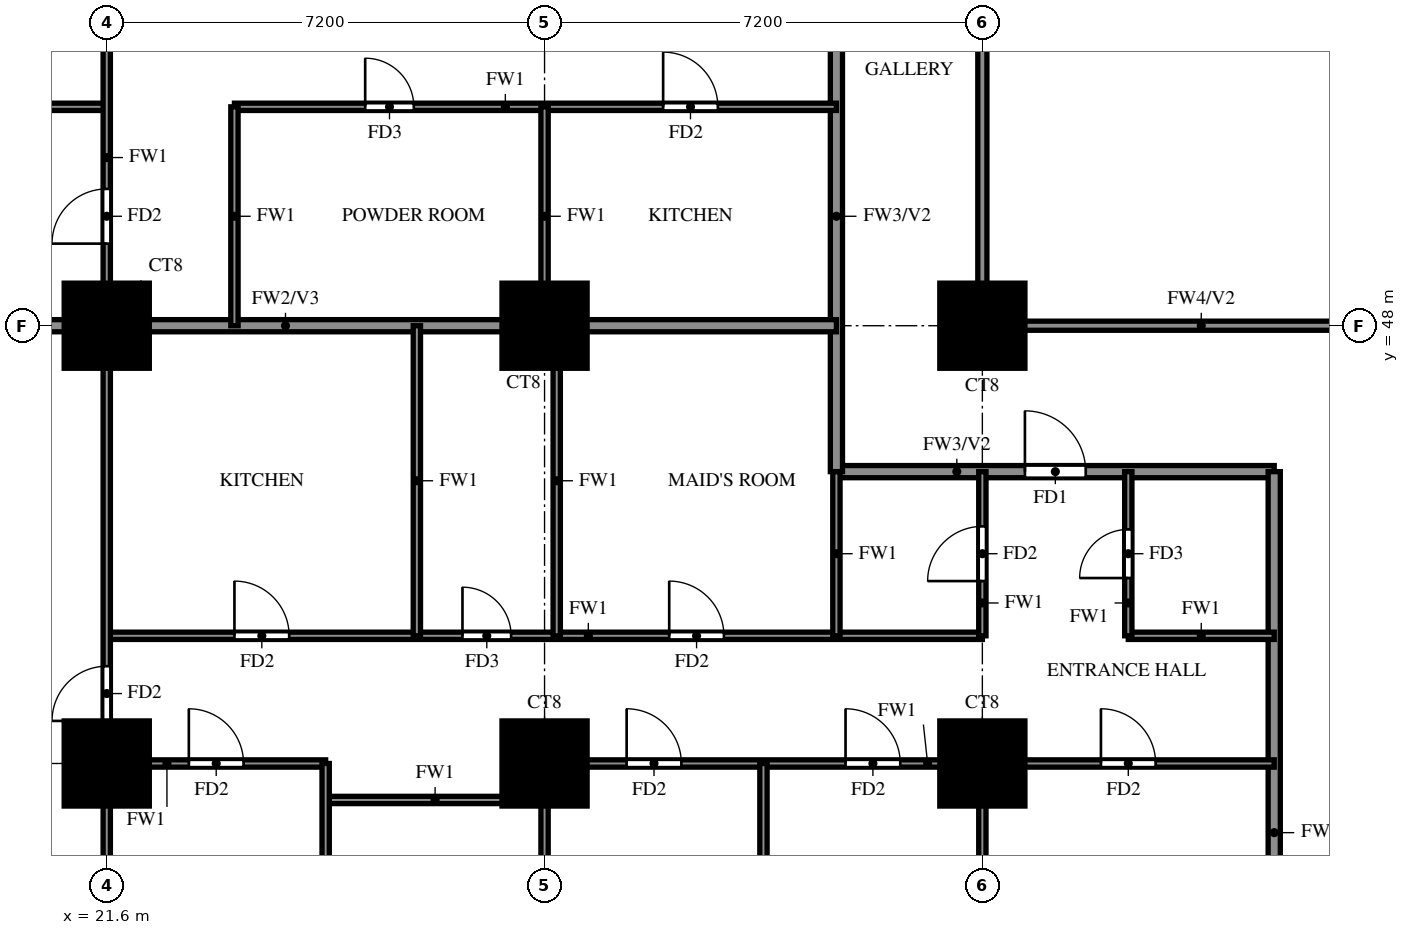
"""IFC4 building model, lengths in metres.
Left out: names, types, materials, properties, quantities, classifications, styles, units other than length and angle.
Written with IfcOpenShell. Run it as: python <this file> out.ifc"""

import sys

from ifc_helpers import new_model, si_unit, direction, frame, frame_2d, origin, origin_2d, place, context, subcontext, project, spatial, rectangle, extrude, source, transform, mapped, element, fill, save


model = new_model("IFC4")
c1 = context("Model", 3, precision=1e-05, world=origin(), true_north=direction((0.0, 1.0)))
c2 = subcontext(c1, "Body", "Model", "MODEL_VIEW")
j1 = project(units=[si_unit("LENGTHUNIT", "METRE"), si_unit("PLANEANGLEUNIT", "RADIAN")], contexts=[c1])
p1 = place(None, origin())
s1 = spatial("IfcSite", under=j1, at=p1, CompositionType="ELEMENT")
p2 = place(p1, origin())
s2 = spatial("IfcBuilding", under=s1, at=p2, CompositionType="ELEMENT")
p3 = place(p2, frame((0.0, 0.0, 48.0)))
s3 = spatial("IfcBuildingStorey", under=s2, at=p3, CompositionType="ELEMENT", Elevation=48.0)
m1 = source(origin(), c2, "Body", "SweptSolid", [
    extrude(rectangle(XDim=1.4, YDim=1.4, at=origin_2d()), origin(), (0.0, 0.0, 1.0), 3.18),
])
for number, where, z_axis, x_axis in (
    (1, (21.6, 40.8, 0.0), (0.0, 0.0, 1.0), (1.0, 0.0, 0.0)),
    (2, (28.8, 40.8, 0.0), (0.0, 0.0, 1.0), (1.0, 0.0, 0.0)),
    (3, (36.0, 40.8, 0.0), (0.0, 0.0, 1.0), (1.0, 0.0, 0.0)),
    (4, (21.6, 48.0, 0.0), (0.0, 0.0, 1.0), (1.0, 0.0, 0.0)),
    (5, (28.8, 48.0, 0.0), (0.0, 0.0, 1.0), (1.0, 0.0, 0.0)),
    (6, (36.0, 48.0, 0.0), (0.0, 0.0, 1.0), (1.0, 0.0, 0.0)),
):
    element("IfcColumn", number, at=place(p3, frame(where, z_axis=z_axis, x_axis=x_axis)), inside=s3, PredefinedType="COLUMN", context=c2, shape_type="MappedRepresentation", body=[
        mapped(m1, transform((0.0, 0.0, 0.0))),
    ])
p4 = place(p3, frame((33.6, 45.6, 0.0), z_axis=(0.0, 0.0, 1.0), x_axis=(1.0, 0.0, 0.0)))
e7 = element("IfcWall", 7, at=p4, inside=s3, PredefinedType="SOLIDWALL", context=c2, shape_type="SweptSolid", body=[
    extrude(rectangle(XDim=7.2, YDim=0.2, at=frame_2d((3.6, 0.0))), origin(), (0.0, 0.0, 1.0), 3.18),
])
p5 = place(p4, frame((3.1, 0.0, 0.0)))
e8 = element("IfcOpeningElement", 8, at=p5, cuts=e7, PredefinedType="OPENING", context=c2, shape_type="SweptSolid", body=[
    extrude(rectangle(XDim=1.0, YDim=2.1, at=frame_2d((0.5, 1.05))), frame((0.0, 0.11, 0.0), z_axis=(0.0, -1.0, 0.0), x_axis=(1.0, 0.0, 0.0)), (0.0, 0.0, 1.0), 0.22),
])
p6 = place(p3, frame((33.6, 45.6, 0.0), z_axis=(0.0, 0.0, 1.0), x_axis=(0.0, 1.0, 0.0)))
e9 = element("IfcWall", 9, at=p6, inside=s3, PredefinedType="SOLIDWALL", context=c2, shape_type="SweptSolid", body=[
    extrude(rectangle(XDim=8.4, YDim=0.2, at=frame_2d((4.2, 0.0))), origin(), (0.0, 0.0, 1.0), 3.18),
])
p7 = place(p3, frame((40.8, 33.725, 0.0), z_axis=(0.0, 0.0, 1.0), x_axis=(0.0, 1.0, 0.0)))
e10 = element("IfcWall", 10, at=p7, inside=s3, PredefinedType="SOLIDWALL", context=c2, shape_type="SweptSolid", body=[
    extrude(rectangle(XDim=11.875, YDim=0.2, at=frame_2d((5.938, 0.0))), origin(), (0.0, 0.0, 1.0), 2.28),
])
p8 = place(p3, frame((14.525, 48.0, 0.0), z_axis=(0.0, 0.0, 1.0), x_axis=(1.0, 0.0, 0.0)))
e11 = element("IfcWall", 11, at=p8, inside=s3, PredefinedType="SOLIDWALL", context=c2, shape_type="SweptSolid", body=[
    extrude(rectangle(XDim=19.075, YDim=0.2, at=frame_2d((9.538, 0.0))), origin(), (0.0, 0.0, 1.0), 3.18),
])
p9 = place(p3, frame((25.2, 40.2, 0.0), z_axis=(0.0, 0.0, 1.0), x_axis=(1.0, 0.0, 0.0)))
e12 = element("IfcWall", 12, at=p9, inside=s3, PredefinedType="PARTITIONING", context=c2, shape_type="SweptSolid", body=[
    extrude(rectangle(XDim=3.6, YDim=0.12, at=frame_2d((1.8, 0.0))), origin(), (0.0, 0.0, 1.0), 3.18),
])
p10 = place(p3, frame((21.6, 40.8, 0.0), z_axis=(0.0, 0.0, 1.0), x_axis=(1.0, 0.0, 0.0)))
e13 = element("IfcWall", 13, at=p10, inside=s3, PredefinedType="PARTITIONING", context=c2, shape_type="SweptSolid", body=[
    extrude(rectangle(XDim=3.6, YDim=0.12, at=frame_2d((1.8, 0.0))), origin(), (0.0, 0.0, 1.0), 3.18),
])
p11 = place(p10, frame((1.35, 0.0, 0.0)))
e14 = element("IfcOpeningElement", 14, at=p11, cuts=e13, PredefinedType="OPENING", context=c2, shape_type="SweptSolid", body=[
    extrude(rectangle(XDim=0.9, YDim=2.1, at=frame_2d((0.45, 1.05))), frame((0.0, 0.07, 0.0), z_axis=(0.0, -1.0, 0.0), x_axis=(1.0, 0.0, 0.0)), (0.0, 0.0, 1.0), 0.14),
])
p12 = place(p3, frame((28.8, 40.8, 0.0), z_axis=(0.0, 0.0, 1.0), x_axis=(1.0, 0.0, 0.0)))
e15 = element("IfcWall", 15, at=p12, inside=s3, PredefinedType="PARTITIONING", context=c2, shape_type="SweptSolid", body=[
    extrude(rectangle(XDim=12.0, YDim=0.12, at=frame_2d((6.0, 0.0))), origin(), (0.0, 0.0, 1.0), 3.18),
])
p13 = place(p12, frame((1.35, 0.0, 0.0)))
e16 = element("IfcOpeningElement", 16, at=p13, cuts=e15, PredefinedType="OPENING", context=c2, shape_type="SweptSolid", body=[
    extrude(rectangle(XDim=0.9, YDim=2.1, at=frame_2d((0.45, 1.05))), frame((0.0, 0.07, 0.0), z_axis=(0.0, -1.0, 0.0), x_axis=(1.0, 0.0, 0.0)), (0.0, 0.0, 1.0), 0.14),
])
p14 = place(p12, frame((4.95, 0.0, 0.0)))
e17 = element("IfcOpeningElement", 17, at=p14, cuts=e15, PredefinedType="OPENING", context=c2, shape_type="SweptSolid", body=[
    extrude(rectangle(XDim=0.9, YDim=2.1, at=frame_2d((0.45, 1.05))), frame((0.0, 0.07, 0.0), z_axis=(0.0, -1.0, 0.0), x_axis=(1.0, 0.0, 0.0)), (0.0, 0.0, 1.0), 0.14),
])
p15 = place(p12, frame((9.15, 0.0, 0.0)))
e18 = element("IfcOpeningElement", 18, at=p15, cuts=e15, PredefinedType="OPENING", context=c2, shape_type="SweptSolid", body=[
    extrude(rectangle(XDim=0.9, YDim=2.1, at=frame_2d((0.45, 1.05))), frame((0.0, 0.07, 0.0), z_axis=(0.0, -1.0, 0.0), x_axis=(1.0, 0.0, 0.0)), (0.0, 0.0, 1.0), 0.14),
])
p16 = place(p3, frame((21.6, 42.9, 0.0), z_axis=(0.0, 0.0, 1.0), x_axis=(1.0, 0.0, 0.0)))
e19 = element("IfcWall", 19, at=p16, inside=s3, PredefinedType="PARTITIONING", context=c2, shape_type="SweptSolid", body=[
    extrude(rectangle(XDim=14.4, YDim=0.12, at=frame_2d((7.2, 0.0))), origin(), (0.0, 0.0, 1.0), 3.18),
])
p17 = place(p16, frame((2.1, 0.0, 0.0)))
e20 = element("IfcOpeningElement", 20, at=p17, cuts=e19, PredefinedType="OPENING", context=c2, shape_type="SweptSolid", body=[
    extrude(rectangle(XDim=0.9, YDim=2.1, at=frame_2d((0.45, 1.05))), frame((0.0, 0.07, 0.0), z_axis=(0.0, -1.0, 0.0), x_axis=(1.0, 0.0, 0.0)), (0.0, 0.0, 1.0), 0.14),
])
p18 = place(p16, frame((5.85, 0.0, 0.0)))
e21 = element("IfcOpeningElement", 21, at=p18, cuts=e19, PredefinedType="OPENING", context=c2, shape_type="SweptSolid", body=[
    extrude(rectangle(XDim=0.8, YDim=2.1, at=frame_2d((0.4, 1.05))), frame((0.0, 0.07, 0.0), z_axis=(0.0, -1.0, 0.0), x_axis=(1.0, 0.0, 0.0)), (0.0, 0.0, 1.0), 0.14),
])
p19 = place(p16, frame((9.25, 0.0, 0.0)))
e22 = element("IfcOpeningElement", 22, at=p19, cuts=e19, PredefinedType="OPENING", context=c2, shape_type="SweptSolid", body=[
    extrude(rectangle(XDim=0.9, YDim=2.1, at=frame_2d((0.45, 1.05))), frame((0.0, 0.07, 0.0), z_axis=(0.0, -1.0, 0.0), x_axis=(1.0, 0.0, 0.0)), (0.0, 0.0, 1.0), 0.14),
])
p20 = place(p3, frame((38.4, 42.9, 0.0), z_axis=(0.0, 0.0, 1.0), x_axis=(1.0, 0.0, 0.0)))
e23 = element("IfcWall", 23, at=p20, inside=s3, PredefinedType="PARTITIONING", context=c2, shape_type="SweptSolid", body=[
    extrude(rectangle(XDim=2.4, YDim=0.12, at=frame_2d((1.2, 0.0))), origin(), (0.0, 0.0, 1.0), 3.18),
])
p21 = place(p3, frame((14.525, 51.6, 0.0), z_axis=(0.0, 0.0, 1.0), x_axis=(1.0, 0.0, 0.0)))
e24 = element("IfcWall", 24, at=p21, inside=s3, PredefinedType="PARTITIONING", context=c2, shape_type="SweptSolid", body=[
    extrude(rectangle(XDim=7.075, YDim=0.12, at=frame_2d((3.538, 0.0))), origin(), (0.0, 0.0, 1.0), 2.28),
])
p22 = place(p3, frame((23.7, 51.6, 0.0), z_axis=(0.0, 0.0, 1.0), x_axis=(1.0, 0.0, 0.0)))
e25 = element("IfcWall", 25, at=p22, inside=s3, PredefinedType="PARTITIONING", context=c2, shape_type="SweptSolid", body=[
    extrude(rectangle(XDim=9.9, YDim=0.12, at=frame_2d((4.95, 0.0))), origin(), (0.0, 0.0, 1.0), 3.18),
])
p23 = place(p22, frame((2.15, 0.0, 0.0)))
e26 = element("IfcOpeningElement", 26, at=p23, cuts=e25, PredefinedType="OPENING", context=c2, shape_type="SweptSolid", body=[
    extrude(rectangle(XDim=0.8, YDim=2.1, at=frame_2d((0.4, 1.05))), frame((0.0, 0.07, 0.0), z_axis=(0.0, -1.0, 0.0), x_axis=(1.0, 0.0, 0.0)), (0.0, 0.0, 1.0), 0.14),
])
p24 = place(p22, frame((7.05, 0.0, 0.0)))
e27 = element("IfcOpeningElement", 27, at=p24, cuts=e25, PredefinedType="OPENING", context=c2, shape_type="SweptSolid", body=[
    extrude(rectangle(XDim=0.9, YDim=2.1, at=frame_2d((0.45, 1.05))), frame((0.0, 0.07, 0.0), z_axis=(0.0, -1.0, 0.0), x_axis=(1.0, 0.0, 0.0)), (0.0, 0.0, 1.0), 0.14),
])
p25 = place(p3, frame((21.6, 33.725, 0.0), z_axis=(0.0, 0.0, 1.0), x_axis=(0.0, 1.0, 0.0)))
e28 = element("IfcWall", 28, at=p25, inside=s3, PredefinedType="PARTITIONING", context=c2, shape_type="SweptSolid", body=[
    extrude(rectangle(XDim=35.875, YDim=0.12, at=frame_2d((17.938, 0.0))), origin(), (0.0, 0.0, 1.0), 3.18),
])
p26 = place(p25, frame((7.775, 0.0, 0.0)))
e29 = element("IfcOpeningElement", 29, at=p26, cuts=e28, PredefinedType="OPENING", context=c2, shape_type="SweptSolid", body=[
    extrude(rectangle(XDim=0.9, YDim=2.1, at=frame_2d((0.45, 1.05))), frame((0.0, 0.07, 0.0), z_axis=(0.0, -1.0, 0.0), x_axis=(1.0, 0.0, 0.0)), (0.0, 0.0, 1.0), 0.14),
])
p27 = place(p25, frame((15.625, 0.0, 0.0)))
e30 = element("IfcOpeningElement", 30, at=p27, cuts=e28, PredefinedType="OPENING", context=c2, shape_type="SweptSolid", body=[
    extrude(rectangle(XDim=0.9, YDim=2.1, at=frame_2d((0.45, 1.05))), frame((0.0, 0.07, 0.0), z_axis=(0.0, -1.0, 0.0), x_axis=(1.0, 0.0, 0.0)), (0.0, 0.0, 1.0), 0.14),
])
p28 = place(p25, frame((22.225, 0.0, 0.0)))
e31 = element("IfcOpeningElement", 31, at=p28, cuts=e28, PredefinedType="OPENING", context=c2, shape_type="SweptSolid", body=[
    extrude(rectangle(XDim=1.5, YDim=2.1, at=frame_2d((0.75, 1.05))), frame((0.0, 0.07, 0.0), z_axis=(0.0, -1.0, 0.0), x_axis=(1.0, 0.0, 0.0)), (0.0, 0.0, 1.0), 0.14),
])
p29 = place(p25, frame((26.425, 0.0, 0.0)))
e32 = element("IfcOpeningElement", 32, at=p29, cuts=e28, PredefinedType="OPENING", context=c2, shape_type="SweptSolid", body=[
    extrude(rectangle(XDim=0.9, YDim=2.1, at=frame_2d((0.45, 1.05))), frame((0.0, 0.07, 0.0), z_axis=(0.0, -1.0, 0.0), x_axis=(1.0, 0.0, 0.0)), (0.0, 0.0, 1.0), 0.14),
])
p30 = place(p25, frame((31.825, 0.0, 0.0)))
e33 = element("IfcOpeningElement", 33, at=p30, cuts=e28, PredefinedType="OPENING", context=c2, shape_type="SweptSolid", body=[
    extrude(rectangle(XDim=0.9, YDim=2.1, at=frame_2d((0.45, 1.05))), frame((0.0, 0.07, 0.0), z_axis=(0.0, -1.0, 0.0), x_axis=(1.0, 0.0, 0.0)), (0.0, 0.0, 1.0), 0.14),
])
p31 = place(p3, frame((23.7, 48.0, 0.0), z_axis=(0.0, 0.0, 1.0), x_axis=(0.0, 1.0, 0.0)))
e34 = element("IfcWall", 34, at=p31, inside=s3, PredefinedType="PARTITIONING", context=c2, shape_type="SweptSolid", body=[
    extrude(rectangle(XDim=3.6, YDim=0.12, at=frame_2d((1.8, 0.0))), origin(), (0.0, 0.0, 1.0), 3.18),
])
p32 = place(p3, frame((25.2, 33.725, 0.0), z_axis=(0.0, 0.0, 1.0), x_axis=(0.0, 1.0, 0.0)))
e35 = element("IfcWall", 35, at=p32, inside=s3, PredefinedType="PARTITIONING", context=c2, shape_type="SweptSolid", body=[
    extrude(rectangle(XDim=7.075, YDim=0.12, at=frame_2d((3.538, 0.0))), origin(), (0.0, 0.0, 1.0), 2.28),
])
p33 = place(p32, frame((2.837, 0.0, 0.0)))
e36 = element("IfcOpeningElement", 36, at=p33, cuts=e35, PredefinedType="OPENING", context=c2, shape_type="SweptSolid", body=[
    extrude(rectangle(XDim=0.8, YDim=2.1, at=frame_2d((0.4, 1.05))), frame((0.0, 0.07, 0.0), z_axis=(0.0, -1.0, 0.0), x_axis=(1.0, 0.0, 0.0)), (0.0, 0.0, 1.0), 0.14),
])
p34 = place(p3, frame((26.7, 42.9, 0.0), z_axis=(0.0, 0.0, 1.0), x_axis=(0.0, 1.0, 0.0)))
e37 = element("IfcWall", 37, at=p34, inside=s3, PredefinedType="PARTITIONING", context=c2, shape_type="SweptSolid", body=[
    extrude(rectangle(XDim=5.1, YDim=0.12, at=frame_2d((2.55, 0.0))), origin(), (0.0, 0.0, 1.0), 3.18),
])
p35 = place(p3, frame((28.8, 33.725, 0.0), z_axis=(0.0, 0.0, 1.0), x_axis=(0.0, 1.0, 0.0)))
e38 = element("IfcWall", 38, at=p35, inside=s3, PredefinedType="PARTITIONING", context=c2, shape_type="SweptSolid", body=[
    extrude(rectangle(XDim=7.075, YDim=0.12, at=frame_2d((3.538, 0.0))), origin(), (0.0, 0.0, 1.0), 3.18),
])
p36 = place(p3, frame((28.8, 48.0, 0.0), z_axis=(0.0, 0.0, 1.0), x_axis=(0.0, 1.0, 0.0)))
e39 = element("IfcWall", 39, at=p36, inside=s3, PredefinedType="PARTITIONING", context=c2, shape_type="SweptSolid", body=[
    extrude(rectangle(XDim=3.6, YDim=0.12, at=frame_2d((1.8, 0.0))), origin(), (0.0, 0.0, 1.0), 3.18),
])
p37 = place(p3, frame((29.0, 42.9, 0.0), z_axis=(0.0, 0.0, 1.0), x_axis=(0.0, 1.0, 0.0)))
e40 = element("IfcWall", 40, at=p37, inside=s3, PredefinedType="PARTITIONING", context=c2, shape_type="SweptSolid", body=[
    extrude(rectangle(XDim=5.1, YDim=0.12, at=frame_2d((2.55, 0.0))), origin(), (0.0, 0.0, 1.0), 3.18),
])
p38 = place(p3, frame((32.4, 33.725, 0.0), z_axis=(0.0, 0.0, 1.0), x_axis=(0.0, 1.0, 0.0)))
e41 = element("IfcWall", 41, at=p38, inside=s3, PredefinedType="PARTITIONING", context=c2, shape_type="SweptSolid", body=[
    extrude(rectangle(XDim=7.075, YDim=0.12, at=frame_2d((3.538, 0.0))), origin(), (0.0, 0.0, 1.0), 2.28),
])
p39 = place(p3, frame((33.6, 42.9, 0.0), z_axis=(0.0, 0.0, 1.0), x_axis=(0.0, 1.0, 0.0)))
e42 = element("IfcWall", 42, at=p39, inside=s3, PredefinedType="PARTITIONING", context=c2, shape_type="SweptSolid", body=[
    extrude(rectangle(XDim=2.7, YDim=0.12, at=frame_2d((1.35, 0.0))), origin(), (0.0, 0.0, 1.0), 3.18),
])
p40 = place(p3, frame((36.0, 33.725, 0.0), z_axis=(0.0, 0.0, 1.0), x_axis=(0.0, 1.0, 0.0)))
e43 = element("IfcWall", 43, at=p40, inside=s3, PredefinedType="PARTITIONING", context=c2, shape_type="SweptSolid", body=[
    extrude(rectangle(XDim=7.075, YDim=0.12, at=frame_2d((3.538, 0.0))), origin(), (0.0, 0.0, 1.0), 3.18),
])
p41 = place(p3, frame((36.0, 42.9, 0.0), z_axis=(0.0, 0.0, 1.0), x_axis=(0.0, 1.0, 0.0)))
e44 = element("IfcWall", 44, at=p41, inside=s3, PredefinedType="PARTITIONING", context=c2, shape_type="SweptSolid", body=[
    extrude(rectangle(XDim=2.7, YDim=0.12, at=frame_2d((1.35, 0.0))), origin(), (0.0, 0.0, 1.0), 3.18),
])
p42 = place(p41, frame((0.9, 0.0, 0.0)))
e45 = element("IfcOpeningElement", 45, at=p42, cuts=e44, PredefinedType="OPENING", context=c2, shape_type="SweptSolid", body=[
    extrude(rectangle(XDim=0.9, YDim=2.1, at=frame_2d((0.45, 1.05))), frame((0.0, 0.07, 0.0), z_axis=(0.0, -1.0, 0.0), x_axis=(1.0, 0.0, 0.0)), (0.0, 0.0, 1.0), 0.14),
])
p43 = place(p3, frame((38.4, 42.9, 0.0), z_axis=(0.0, 0.0, 1.0), x_axis=(0.0, 1.0, 0.0)))
e46 = element("IfcWall", 46, at=p43, inside=s3, PredefinedType="PARTITIONING", context=c2, shape_type="SweptSolid", body=[
    extrude(rectangle(XDim=2.7, YDim=0.12, at=frame_2d((1.35, 0.0))), origin(), (0.0, 0.0, 1.0), 3.18),
])
p44 = place(p43, frame((0.95, 0.0, 0.0)))
e47 = element("IfcOpeningElement", 47, at=p44, cuts=e46, PredefinedType="OPENING", context=c2, shape_type="SweptSolid", body=[
    extrude(rectangle(XDim=0.8, YDim=2.1, at=frame_2d((0.4, 1.05))), frame((0.0, 0.07, 0.0), z_axis=(0.0, -1.0, 0.0), x_axis=(1.0, 0.0, 0.0)), (0.0, 0.0, 1.0), 0.14),
])
p45 = place(p3, frame((36.0, 48.0, 0.0), z_axis=(0.0, 0.0, 1.0), x_axis=(1.0, 0.0, 0.0)))
e48 = element("IfcWall", 48, at=p45, inside=s3, PredefinedType="SOLIDWALL", context=c2, shape_type="SweptSolid", body=[
    extrude(rectangle(XDim=7.2, YDim=0.15, at=frame_2d((3.6, 0.0))), origin(), (0.0, 0.0, 1.0), 2.28),
])
p46 = place(p3, frame((36.0, 48.0, 0.0), z_axis=(0.0, 0.0, 1.0), x_axis=(0.0, 1.0, 0.0)))
e49 = element("IfcWall", 49, at=p46, inside=s3, PredefinedType="SOLIDWALL", context=c2, shape_type="SweptSolid", body=[
    extrude(rectangle(XDim=14.4, YDim=0.15, at=frame_2d((7.2, 0.0))), origin(), (0.0, 0.0, 1.0), 2.28),
])
p47 = place(p5, origin())
e50 = element("IfcDoor", 50, at=p47, inside=s3, OperationType="SINGLE_SWING_LEFT", PredefinedType="DOOR", context=c2, shape_type="SweptSolid", body=[
    extrude(rectangle(XDim=1.0, YDim=2.1, at=frame_2d((0.5, 1.05))), frame((0.0, 0.025, 0.0), z_axis=(0.0, -1.0, 0.0), x_axis=(1.0, 0.0, 0.0)), (0.0, 0.0, 1.0), 0.05),
])
fill(e8, e50)
p48 = place(p26, origin())
e51 = element("IfcDoor", 51, at=p48, inside=s3, OperationType="SINGLE_SWING_LEFT", PredefinedType="DOOR", context=c2, shape_type="SweptSolid", body=[
    extrude(rectangle(XDim=0.9, YDim=2.1, at=frame_2d((0.45, 1.05))), frame((0.0, 0.025, 0.0), z_axis=(0.0, -1.0, 0.0), x_axis=(1.0, 0.0, 0.0)), (0.0, 0.0, 1.0), 0.05),
])
fill(e29, e51)
p49 = place(p11, origin())
e52 = element("IfcDoor", 52, at=p49, inside=s3, OperationType="SINGLE_SWING_LEFT", PredefinedType="DOOR", context=c2, shape_type="SweptSolid", body=[
    extrude(rectangle(XDim=0.9, YDim=2.1, at=frame_2d((0.45, 1.05))), frame((0.0, 0.025, 0.0), z_axis=(0.0, -1.0, 0.0), x_axis=(1.0, 0.0, 0.0)), (0.0, 0.0, 1.0), 0.05),
])
fill(e14, e52)
p50 = place(p13, origin())
e53 = element("IfcDoor", 53, at=p50, inside=s3, OperationType="SINGLE_SWING_RIGHT", PredefinedType="DOOR", context=c2, shape_type="SweptSolid", body=[
    extrude(rectangle(XDim=0.9, YDim=2.1, at=frame_2d((0.45, 1.05))), frame((0.0, 0.025, 0.0), z_axis=(0.0, -1.0, 0.0), x_axis=(1.0, 0.0, 0.0)), (0.0, 0.0, 1.0), 0.05),
])
fill(e16, e53)
p51 = place(p14, origin())
e54 = element("IfcDoor", 54, at=p51, inside=s3, OperationType="SINGLE_SWING_LEFT", PredefinedType="DOOR", context=c2, shape_type="SweptSolid", body=[
    extrude(rectangle(XDim=0.9, YDim=2.1, at=frame_2d((0.45, 1.05))), frame((0.0, 0.025, 0.0), z_axis=(0.0, -1.0, 0.0), x_axis=(1.0, 0.0, 0.0)), (0.0, 0.0, 1.0), 0.05),
])
fill(e17, e54)
p52 = place(p15, origin())
e55 = element("IfcDoor", 55, at=p52, inside=s3, OperationType="SINGLE_SWING_LEFT", PredefinedType="DOOR", context=c2, shape_type="SweptSolid", body=[
    extrude(rectangle(XDim=0.9, YDim=2.1, at=frame_2d((0.45, 1.05))), frame((0.0, 0.025, 0.0), z_axis=(0.0, -1.0, 0.0), x_axis=(1.0, 0.0, 0.0)), (0.0, 0.0, 1.0), 0.05),
])
fill(e18, e55)
p53 = place(p17, origin())
e56 = element("IfcDoor", 56, at=p53, inside=s3, OperationType="SINGLE_SWING_RIGHT", PredefinedType="DOOR", context=c2, shape_type="SweptSolid", body=[
    extrude(rectangle(XDim=0.9, YDim=2.1, at=frame_2d((0.45, 1.05))), frame((0.0, 0.025, 0.0), z_axis=(0.0, -1.0, 0.0), x_axis=(1.0, 0.0, 0.0)), (0.0, 0.0, 1.0), 0.05),
])
fill(e20, e56)
p54 = place(p18, origin())
e57 = element("IfcDoor", 57, at=p54, inside=s3, OperationType="SINGLE_SWING_LEFT", PredefinedType="DOOR", context=c2, shape_type="SweptSolid", body=[
    extrude(rectangle(XDim=0.8, YDim=2.1, at=frame_2d((0.4, 1.05))), frame((0.0, 0.025, 0.0), z_axis=(0.0, -1.0, 0.0), x_axis=(1.0, 0.0, 0.0)), (0.0, 0.0, 1.0), 0.05),
])
fill(e21, e57)
p55 = place(p19, origin())
e58 = element("IfcDoor", 58, at=p55, inside=s3, OperationType="SINGLE_SWING_LEFT", PredefinedType="DOOR", context=c2, shape_type="SweptSolid", body=[
    extrude(rectangle(XDim=0.9, YDim=2.1, at=frame_2d((0.45, 1.05))), frame((0.0, 0.025, 0.0), z_axis=(0.0, -1.0, 0.0), x_axis=(1.0, 0.0, 0.0)), (0.0, 0.0, 1.0), 0.05),
])
fill(e22, e58)
p56 = place(p42, origin())
e59 = element("IfcDoor", 59, at=p56, inside=s3, OperationType="SINGLE_SWING_RIGHT", PredefinedType="DOOR", context=c2, shape_type="SweptSolid", body=[
    extrude(rectangle(XDim=0.9, YDim=2.1, at=frame_2d((0.45, 1.05))), frame((0.0, 0.025, 0.0), z_axis=(0.0, -1.0, 0.0), x_axis=(1.0, 0.0, 0.0)), (0.0, 0.0, 1.0), 0.05),
])
fill(e45, e59)
p57 = place(p44, origin())
e60 = element("IfcDoor", 60, at=p57, inside=s3, OperationType="SINGLE_SWING_LEFT", PredefinedType="DOOR", context=c2, shape_type="SweptSolid", body=[
    extrude(rectangle(XDim=0.8, YDim=2.1, at=frame_2d((0.4, 1.05))), frame((0.0, 0.025, 0.0), z_axis=(0.0, -1.0, 0.0), x_axis=(1.0, 0.0, 0.0)), (0.0, 0.0, 1.0), 0.05),
])
fill(e47, e60)
p58 = place(p27, origin())
e61 = element("IfcDoor", 61, at=p58, inside=s3, OperationType="SINGLE_SWING_RIGHT", PredefinedType="DOOR", context=c2, shape_type="SweptSolid", body=[
    extrude(rectangle(XDim=0.9, YDim=2.1, at=frame_2d((0.45, 1.05))), frame((0.0, 0.025, 0.0), z_axis=(0.0, -1.0, 0.0), x_axis=(1.0, 0.0, 0.0)), (0.0, 0.0, 1.0), 0.05),
])
fill(e30, e61)
p59 = place(p23, origin())
e62 = element("IfcDoor", 62, at=p59, inside=s3, OperationType="SINGLE_SWING_LEFT", PredefinedType="DOOR", context=c2, shape_type="SweptSolid", body=[
    extrude(rectangle(XDim=0.8, YDim=2.1, at=frame_2d((0.4, 1.05))), frame((0.0, 0.025, 0.0), z_axis=(0.0, -1.0, 0.0), x_axis=(1.0, 0.0, 0.0)), (0.0, 0.0, 1.0), 0.05),
])
fill(e26, e62)
p60 = place(p24, origin())
e63 = element("IfcDoor", 63, at=p60, inside=s3, OperationType="SINGLE_SWING_LEFT", PredefinedType="DOOR", context=c2, shape_type="SweptSolid", body=[
    extrude(rectangle(XDim=0.9, YDim=2.1, at=frame_2d((0.45, 1.05))), frame((0.0, 0.025, 0.0), z_axis=(0.0, -1.0, 0.0), x_axis=(1.0, 0.0, 0.0)), (0.0, 0.0, 1.0), 0.05),
])
fill(e27, e63)
save(model, sys.argv[1])
